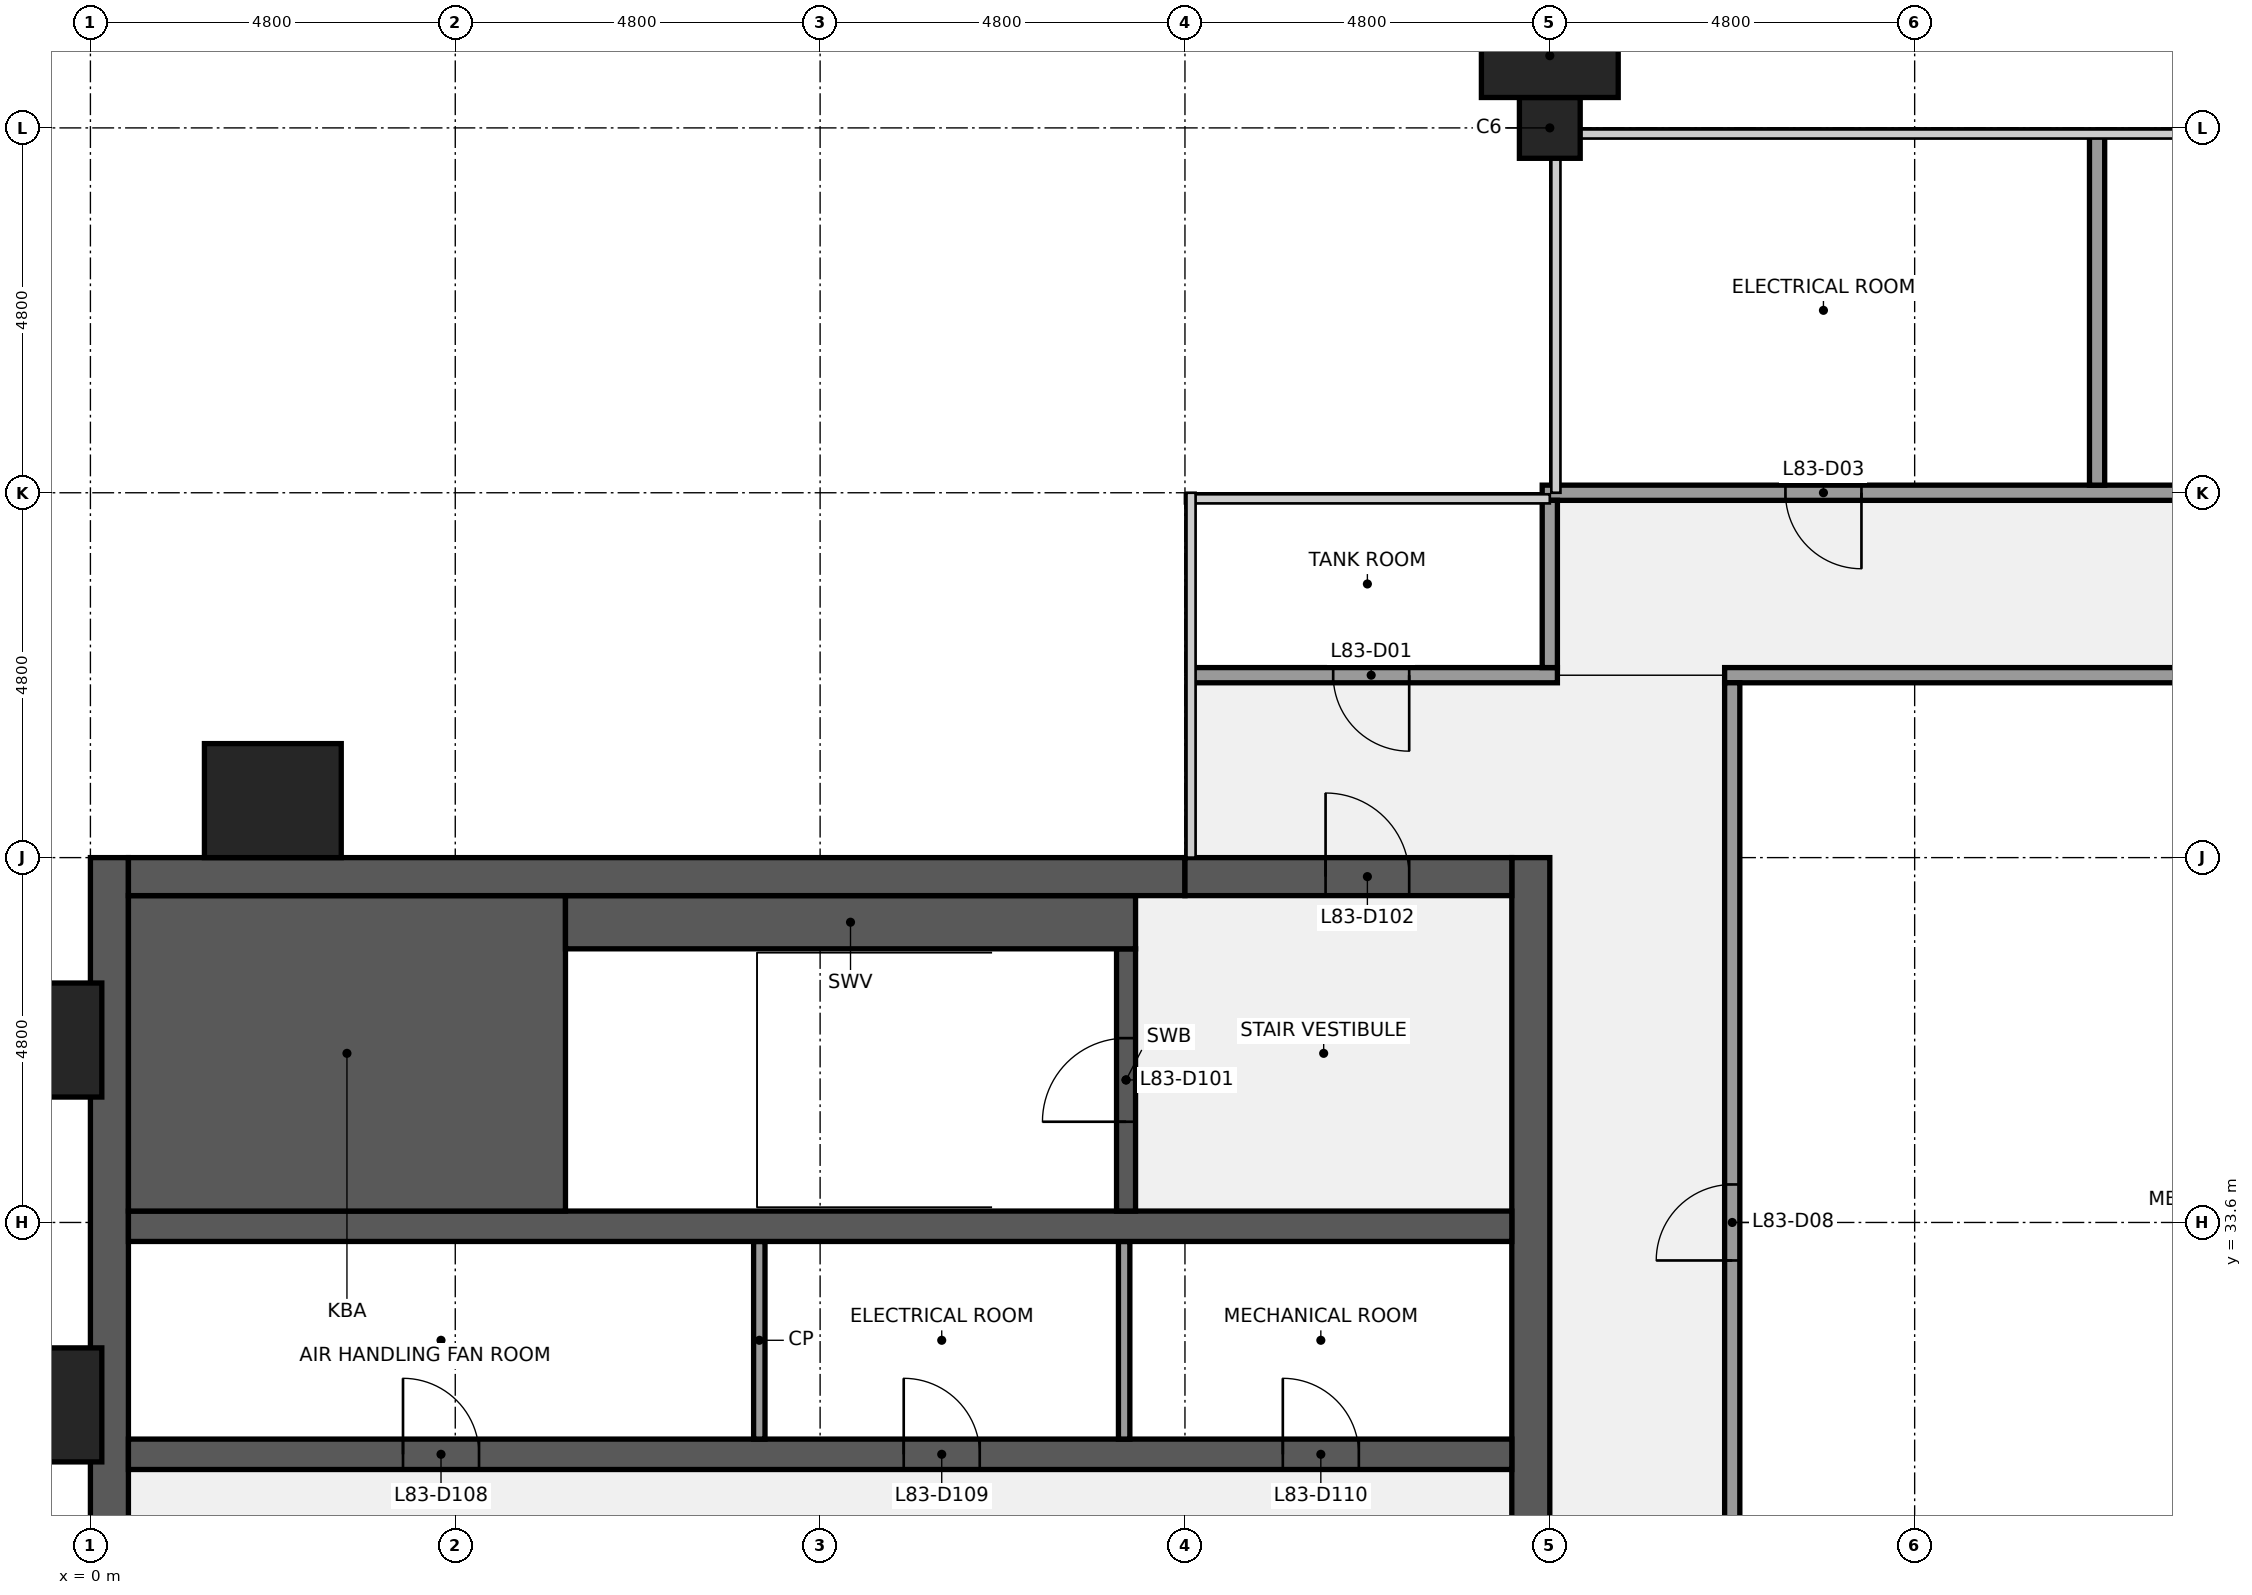
"""IFC4 building model, lengths in metres.
Left out: names, types, materials, properties, quantities, classifications, styles, units other than length and angle.
Written with IfcOpenShell. Run it as: python <this file> out.ifc"""

import sys

from ifc_helpers import new_model, si_unit, direction, frame, frame_2d, origin, origin_2d, place, context, subcontext, project, spatial, polyline, rectangle, outline, extrude, element, fill, save


model = new_model("IFC4")
c1 = context("Model", 3, precision=1e-05, world=origin(), true_north=direction((0.0, 1.0)))
c2 = subcontext(c1, "Body", "Model", "MODEL_VIEW")
j1 = project(units=[si_unit("LENGTHUNIT", "METRE"), si_unit("PLANEANGLEUNIT", "RADIAN")], contexts=[c1])
p1 = place(None, origin())
s1 = spatial("IfcSite", under=j1, at=p1, CompositionType="ELEMENT")
p2 = place(p1, origin())
s2 = spatial("IfcBuilding", under=s1, at=p2, CompositionType="ELEMENT")
p3 = place(p2, frame((0.0, 0.0, 370.3)))
s3 = spatial("IfcBuildingStorey", under=s2, at=p3, CompositionType="ELEMENT", Elevation=370.3)
p4 = place(p3, frame((19.2, 48.0, 0.0), z_axis=(0.0, 0.0, 1.0), x_axis=(1.0, 0.0, 0.0)))
e1 = element("IfcColumn", 1, at=p4, inside=s3, PredefinedType="COLUMN", context=c2, shape_type="SweptSolid", body=[
    extrude(rectangle(XDim=0.8, YDim=0.8, at=origin_2d()), origin(), (0.0, 0.0, 1.0), 4.0),
])
p5 = place(p3, frame((0.25, 10.173, 0.0), z_axis=(0.0, 0.0, 1.0), x_axis=(0.0, 1.0, 0.0)))
e2 = element("IfcWall", 2, at=p5, inside=s3, PredefinedType="SHEAR", context=c2, shape_type="SweptSolid", body=[
    extrude(outline(polyline([(0.0, 0.0), (28.227, 0.0), (28.227, 3.75), (1.247, 3.75), (0.0, 2.488), (0.0, 0.0)])), frame((0.0, 0.25, 0.0), z_axis=(0.0, -1.0, 0.0), x_axis=(1.0, 0.0, 0.0)), (0.0, 0.0, 1.0), 0.5),
])
p6 = place(p3, frame((18.95, 38.4, 0.0), z_axis=(0.0, 0.0, 1.0), x_axis=(0.0, -1.0, 0.0)))
e3 = element("IfcWall", 3, at=p6, inside=s3, PredefinedType="SHEAR", context=c2, shape_type="SweptSolid", body=[
    extrude(outline(polyline([(0.0, 0.0), (28.227, 0.0), (28.227, 2.488), (26.98, 3.75), (0.0, 3.75), (0.0, 0.0)])), frame((0.0, 0.25, 0.0), z_axis=(0.0, -1.0, 0.0), x_axis=(1.0, 0.0, 0.0)), (0.0, 0.0, 1.0), 0.5),
])
p7 = place(p6, frame((18.3, 0.0, 0.0)))
e4 = element("IfcOpeningElement", 4, at=p7, cuts=e3, PredefinedType="OPENING", context=c2, shape_type="SweptSolid", body=[
    extrude(rectangle(XDim=1.8, YDim=2.1, at=frame_2d((0.9, 1.05))), frame((0.0, 0.26, 0.0), z_axis=(0.0, -1.0, 0.0), x_axis=(1.0, 0.0, 0.0)), (0.0, 0.0, 1.0), 0.52),
])
p8 = place(p6, frame((8.7, 0.0, 0.0)))
e5 = element("IfcOpeningElement", 5, at=p8, cuts=e3, PredefinedType="OPENING", context=c2, shape_type="SweptSolid", body=[
    extrude(rectangle(XDim=1.8, YDim=2.1, at=frame_2d((0.9, 1.05))), frame((0.0, 0.26, 0.0), z_axis=(0.0, -1.0, 0.0), x_axis=(1.0, 0.0, 0.0)), (0.0, 0.0, 1.0), 0.52),
])
p9 = place(p3, frame((0.5, 30.55, 0.0), z_axis=(0.0, 0.0, 1.0), x_axis=(1.0, 0.0, 0.0)))
e6 = element("IfcWall", 6, at=p9, inside=s3, PredefinedType="SHEAR", context=c2, shape_type="SweptSolid", body=[
    extrude(rectangle(XDim=18.2, YDim=0.4, at=frame_2d((9.1, 0.0))), origin(), (0.0, 0.0, 1.0), 3.75),
])
p10 = place(p9, frame((3.613, 0.0, 0.0)))
e7 = element("IfcOpeningElement", 7, at=p10, cuts=e6, PredefinedType="OPENING", context=c2, shape_type="SweptSolid", body=[
    extrude(rectangle(XDim=1.0, YDim=2.1, at=frame_2d((0.5, 1.05))), frame((0.0, 0.21, 0.0), z_axis=(0.0, -1.0, 0.0), x_axis=(1.0, 0.0, 0.0)), (0.0, 0.0, 1.0), 0.42),
])
p11 = place(p9, frame((10.2, 0.0, 0.0)))
e8 = element("IfcOpeningElement", 8, at=p11, cuts=e6, PredefinedType="OPENING", context=c2, shape_type="SweptSolid", body=[
    extrude(rectangle(XDim=1.0, YDim=2.1, at=frame_2d((0.5, 1.05))), frame((0.0, 0.21, 0.0), z_axis=(0.0, -1.0, 0.0), x_axis=(1.0, 0.0, 0.0)), (0.0, 0.0, 1.0), 0.42),
])
p12 = place(p9, frame((15.188, 0.0, 0.0)))
e9 = element("IfcOpeningElement", 9, at=p12, cuts=e6, PredefinedType="OPENING", context=c2, shape_type="SweptSolid", body=[
    extrude(rectangle(XDim=1.0, YDim=2.1, at=frame_2d((0.5, 1.05))), frame((0.0, 0.21, 0.0), z_axis=(0.0, -1.0, 0.0), x_axis=(1.0, 0.0, 0.0)), (0.0, 0.0, 1.0), 0.42),
])
for number, where, z_axis, x_axis in (
    (10, (8.8, 30.75, 0.0), (0.0, 0.0, 1.0), (0.0, 1.0, 0.0)),
    (11, (13.6, 30.75, 0.0), (0.0, 0.0, 1.0), (0.0, 1.0, 0.0)),
):
    element("IfcWall", number, at=place(p3, frame(where, z_axis=z_axis, x_axis=x_axis)), inside=s3, PredefinedType="PARTITIONING", context=c2, shape_type="SweptSolid", body=[
        extrude(rectangle(XDim=2.6, YDim=0.15, at=frame_2d((1.3, 0.0))), origin(), (0.0, 0.0, 1.0), 3.75),
    ])
p13 = place(p3, frame((0.5, 33.55, 0.0), z_axis=(0.0, 0.0, 1.0), x_axis=(1.0, 0.0, 0.0)))
e12 = element("IfcWall", 12, at=p13, inside=s3, PredefinedType="SHEAR", context=c2, shape_type="SweptSolid", body=[
    extrude(rectangle(XDim=18.2, YDim=0.4, at=frame_2d((9.1, 0.0))), origin(), (0.0, 0.0, 1.0), 3.75),
])
p14 = place(p3, frame((0.5, 35.825, 0.0), z_axis=(0.0, 0.0, 1.0), x_axis=(1.0, 0.0, 0.0)))
e13 = element("IfcWall", 13, at=p14, inside=s3, PredefinedType="SHEAR", context=c2, shape_type="SweptSolid", body=[
    extrude(rectangle(XDim=5.75, YDim=4.15, at=frame_2d((2.875, 0.0))), origin(), (0.0, 0.0, 1.0), 3.75),
])
p15 = place(p3, frame((13.625, 33.75, 0.0), z_axis=(0.0, 0.0, 1.0), x_axis=(0.0, 1.0, 0.0)))
e14 = element("IfcWall", 14, at=p15, inside=s3, PredefinedType="SHEAR", context=c2, shape_type="SweptSolid", body=[
    extrude(rectangle(XDim=3.45, YDim=0.25, at=frame_2d((1.725, 0.0))), origin(), (0.0, 0.0, 1.0), 3.75),
])
p16 = place(p15, frame((1.175, 0.0, 0.0)))
e15 = element("IfcOpeningElement", 15, at=p16, cuts=e14, PredefinedType="OPENING", context=c2, shape_type="SweptSolid", body=[
    extrude(rectangle(XDim=1.1, YDim=2.1, at=frame_2d((0.55, 1.05))), frame((0.0, 0.135, 0.0), z_axis=(0.0, -1.0, 0.0), x_axis=(1.0, 0.0, 0.0)), (0.0, 0.0, 1.0), 0.27),
])
p17 = place(p3, frame((6.25, 37.55, 0.0), z_axis=(0.0, 0.0, 1.0), x_axis=(1.0, 0.0, 0.0)))
e16 = element("IfcWall", 16, at=p17, inside=s3, PredefinedType="SHEAR", context=c2, shape_type="SweptSolid", body=[
    extrude(rectangle(XDim=7.5, YDim=0.7, at=frame_2d((3.75, 0.0))), origin(), (0.0, 0.0, 1.0), 3.75),
])
p18 = place(p3, frame((0.5, 38.15, 0.0), z_axis=(0.0, 0.0, 1.0), x_axis=(1.0, 0.0, 0.0)))
e17 = element("IfcWall", 17, at=p18, inside=s3, PredefinedType="SHEAR", context=c2, shape_type="SweptSolid", body=[
    extrude(rectangle(XDim=13.9, YDim=0.5, at=frame_2d((6.95, 0.0))), origin(), (0.0, 0.0, 1.0), 3.75),
])
p19 = place(p3, frame((14.4, 38.15, 0.0), z_axis=(0.0, 0.0, 1.0), x_axis=(1.0, 0.0, 0.0)))
e18 = element("IfcWall", 18, at=p19, inside=s3, PredefinedType="SHEAR", context=c2, shape_type="SweptSolid", body=[
    extrude(rectangle(XDim=4.3, YDim=0.5, at=frame_2d((2.15, 0.0))), origin(), (0.0, 0.0, 1.0), 3.75),
])
p20 = place(p19, frame((1.85, 0.0, 0.0)))
e19 = element("IfcOpeningElement", 19, at=p20, cuts=e18, PredefinedType="OPENING", context=c2, shape_type="SweptSolid", body=[
    extrude(rectangle(XDim=1.1, YDim=2.1, at=frame_2d((0.55, 1.05))), frame((0.0, 0.26, 0.0), z_axis=(0.0, -1.0, 0.0), x_axis=(1.0, 0.0, 0.0)), (0.0, 0.0, 1.0), 0.52),
])
p21 = place(p3, frame((14.5, 40.8, 0.0), z_axis=(0.0, 0.0, 1.0), x_axis=(1.0, 0.0, 0.0)))
e20 = element("IfcWall", 20, at=p21, inside=s3, PredefinedType="PARTITIONING", context=c2, shape_type="SweptSolid", body=[
    extrude(rectangle(XDim=4.8, YDim=0.2, at=frame_2d((2.4, 0.0))), origin(), (0.0, 0.0, 1.0), 2.759),
])
p22 = place(p21, frame((1.85, 0.0, 0.0)))
e21 = element("IfcOpeningElement", 21, at=p22, cuts=e20, PredefinedType="OPENING", context=c2, shape_type="SweptSolid", body=[
    extrude(rectangle(XDim=1.0, YDim=2.1, at=frame_2d((0.5, 1.05))), frame((0.0, 0.11, 0.0), z_axis=(0.0, -1.0, 0.0), x_axis=(1.0, 0.0, 0.0)), (0.0, 0.0, 1.0), 0.22),
])
p23 = place(p3, frame((21.5, 40.8, 0.0), z_axis=(0.0, 0.0, 1.0), x_axis=(1.0, 0.0, 0.0)))
e22 = element("IfcWall", 22, at=p23, inside=s3, PredefinedType="PARTITIONING", context=c2, shape_type="SweptSolid", body=[
    extrude(rectangle(XDim=14.6, YDim=0.2, at=frame_2d((7.3, 0.0))), origin(), (0.0, 0.0, 1.0), 2.759),
])
p24 = place(p3, frame((19.1, 43.2, 0.0), z_axis=(0.0, 0.0, 1.0), x_axis=(1.0, 0.0, 0.0)))
e23 = element("IfcWall", 23, at=p24, inside=s3, PredefinedType="PARTITIONING", context=c2, shape_type="SweptSolid", body=[
    extrude(rectangle(XDim=19.4, YDim=0.2, at=frame_2d((9.7, 0.0))), origin(), (0.0, 0.0, 1.0), 2.759),
])
p25 = place(p24, frame((3.2, 0.0, 0.0)))
e24 = element("IfcOpeningElement", 24, at=p25, cuts=e23, PredefinedType="OPENING", context=c2, shape_type="SweptSolid", body=[
    extrude(rectangle(XDim=1.0, YDim=2.1, at=frame_2d((0.5, 1.05))), frame((0.0, 0.11, 0.0), z_axis=(0.0, -1.0, 0.0), x_axis=(1.0, 0.0, 0.0)), (0.0, 0.0, 1.0), 0.22),
])
p26 = place(p24, frame((10.4, 0.0, 0.0)))
e25 = element("IfcOpeningElement", 25, at=p26, cuts=e23, PredefinedType="OPENING", context=c2, shape_type="SweptSolid", body=[
    extrude(rectangle(XDim=1.0, YDim=2.1, at=frame_2d((0.5, 1.05))), frame((0.0, 0.11, 0.0), z_axis=(0.0, -1.0, 0.0), x_axis=(1.0, 0.0, 0.0)), (0.0, 0.0, 1.0), 0.22),
])
p27 = place(p24, frame((16.4, 0.0, 0.0)))
e26 = element("IfcOpeningElement", 26, at=p27, cuts=e23, PredefinedType="OPENING", context=c2, shape_type="SweptSolid", body=[
    extrude(rectangle(XDim=1.0, YDim=2.1, at=frame_2d((0.5, 1.05))), frame((0.0, 0.11, 0.0), z_axis=(0.0, -1.0, 0.0), x_axis=(1.0, 0.0, 0.0)), (0.0, 0.0, 1.0), 0.22),
])
p28 = place(p3, frame((19.2, 40.9, 0.0), z_axis=(0.0, 0.0, 1.0), x_axis=(0.0, 1.0, 0.0)))
e27 = element("IfcWall", 27, at=p28, inside=s3, PredefinedType="PARTITIONING", context=c2, shape_type="SweptSolid", body=[
    extrude(rectangle(XDim=2.2, YDim=0.2, at=frame_2d((1.1, 0.0))), origin(), (0.0, 0.0, 1.0), 2.759),
])
p29 = place(p3, frame((21.6, 26.5, 0.0), z_axis=(0.0, 0.0, 1.0), x_axis=(0.0, 1.0, 0.0)))
e28 = element("IfcWall", 28, at=p29, inside=s3, PredefinedType="PARTITIONING", context=c2, shape_type="SweptSolid", body=[
    extrude(rectangle(XDim=14.2, YDim=0.2, at=frame_2d((7.1, 0.0))), origin(), (0.0, 0.0, 1.0), 2.759),
])
p30 = place(p29, frame((6.6, 0.0, 0.0)))
e29 = element("IfcOpeningElement", 29, at=p30, cuts=e28, PredefinedType="OPENING", context=c2, shape_type="SweptSolid", body=[
    extrude(rectangle(XDim=1.0, YDim=2.1, at=frame_2d((0.5, 1.05))), frame((0.0, 0.11, 0.0), z_axis=(0.0, -1.0, 0.0), x_axis=(1.0, 0.0, 0.0)), (0.0, 0.0, 1.0), 0.22),
])
p31 = place(p3, frame((26.4, 43.3, 0.0), z_axis=(0.0, 0.0, 1.0), x_axis=(0.0, 1.0, 0.0)))
e30 = element("IfcWall", 30, at=p31, inside=s3, PredefinedType="PARTITIONING", context=c2, shape_type="SweptSolid", body=[
    extrude(rectangle(XDim=4.6, YDim=0.2, at=frame_2d((2.3, 0.0))), origin(), (0.0, 0.0, 1.0), 2.759),
])
for number, where, z_axis, x_axis in (
    (31, (-0.75, 31.2, 0.0), (0.0, 0.0, 1.0), (0.0, 1.0, 0.0)),
    (32, (-0.75, 36.0, 0.0), (0.0, 0.0, 1.0), (0.0, 1.0, 0.0)),
    (33, (2.4, 39.15, 0.0), (0.0, 0.0, 1.0), (1.0, 0.0, 0.0)),
):
    element("IfcColumn", number, at=place(p3, frame(where, z_axis=z_axis, x_axis=x_axis)), inside=s3, PredefinedType="PILASTER", context=c2, shape_type="SweptSolid", body=[
        extrude(rectangle(XDim=1.8, YDim=1.5, at=origin_2d()), origin(), (0.0, 0.0, 1.0), 4.0),
    ])
p32 = place(p3, frame((19.2, 48.95, 0.0), z_axis=(0.0, 0.0, 1.0), x_axis=(1.0, 0.0, 0.0)))
e34 = element("IfcColumn", 34, at=p32, inside=s3, PredefinedType="PILASTER", context=c2, shape_type="SweptSolid", body=[
    extrude(rectangle(XDim=1.8, YDim=1.1, at=origin_2d()), origin(), (0.0, 0.0, 1.0), 4.0),
])
p33 = place(p16, origin())
e35 = element("IfcDoor", 35, at=p33, inside=s3, OperationType="SINGLE_SWING_LEFT", PredefinedType="DOOR", context=c2, shape_type="SweptSolid", body=[
    extrude(rectangle(XDim=1.1, YDim=2.1, at=frame_2d((0.55, 1.05))), frame((0.0, 0.025, 0.0), z_axis=(0.0, -1.0, 0.0), x_axis=(1.0, 0.0, 0.0)), (0.0, 0.0, 1.0), 0.05),
])
fill(e15, e35)
p34 = place(p20, origin())
e36 = element("IfcDoor", 36, at=p34, inside=s3, OperationType="SINGLE_SWING_LEFT", PredefinedType="DOOR", context=c2, shape_type="SweptSolid", body=[
    extrude(rectangle(XDim=1.1, YDim=2.1, at=frame_2d((0.55, 1.05))), frame((0.0, 0.025, 0.0), z_axis=(0.0, -1.0, 0.0), x_axis=(1.0, 0.0, 0.0)), (0.0, 0.0, 1.0), 0.05),
])
fill(e19, e36)
p35 = place(p10, origin())
e37 = element("IfcDoor", 37, at=p35, inside=s3, OperationType="SINGLE_SWING_LEFT", PredefinedType="DOOR", context=c2, shape_type="SweptSolid", body=[
    extrude(rectangle(XDim=1.0, YDim=2.1, at=frame_2d((0.5, 1.05))), frame((0.0, 0.025, 0.0), z_axis=(0.0, -1.0, 0.0), x_axis=(1.0, 0.0, 0.0)), (0.0, 0.0, 1.0), 0.05),
])
fill(e7, e37)
p36 = place(p11, origin())
e38 = element("IfcDoor", 38, at=p36, inside=s3, OperationType="SINGLE_SWING_LEFT", PredefinedType="DOOR", context=c2, shape_type="SweptSolid", body=[
    extrude(rectangle(XDim=1.0, YDim=2.1, at=frame_2d((0.5, 1.05))), frame((0.0, 0.025, 0.0), z_axis=(0.0, -1.0, 0.0), x_axis=(1.0, 0.0, 0.0)), (0.0, 0.0, 1.0), 0.05),
])
fill(e8, e38)
p37 = place(p12, origin())
e39 = element("IfcDoor", 39, at=p37, inside=s3, OperationType="SINGLE_SWING_LEFT", PredefinedType="DOOR", context=c2, shape_type="SweptSolid", body=[
    extrude(rectangle(XDim=1.0, YDim=2.1, at=frame_2d((0.5, 1.05))), frame((0.0, 0.025, 0.0), z_axis=(0.0, -1.0, 0.0), x_axis=(1.0, 0.0, 0.0)), (0.0, 0.0, 1.0), 0.05),
])
fill(e9, e39)
p38 = place(p22, origin())
e40 = element("IfcDoor", 40, at=p38, inside=s3, OperationType="SINGLE_SWING_RIGHT", PredefinedType="DOOR", context=c2, shape_type="SweptSolid", body=[
    extrude(rectangle(XDim=1.0, YDim=2.1, at=frame_2d((0.5, 1.05))), frame((0.0, 0.025, 0.0), z_axis=(0.0, -1.0, 0.0), x_axis=(1.0, 0.0, 0.0)), (0.0, 0.0, 1.0), 0.05),
])
fill(e21, e40)
p39 = place(p25, origin())
e41 = element("IfcDoor", 41, at=p39, inside=s3, OperationType="SINGLE_SWING_RIGHT", PredefinedType="DOOR", context=c2, shape_type="SweptSolid", body=[
    extrude(rectangle(XDim=1.0, YDim=2.1, at=frame_2d((0.5, 1.05))), frame((0.0, 0.025, 0.0), z_axis=(0.0, -1.0, 0.0), x_axis=(1.0, 0.0, 0.0)), (0.0, 0.0, 1.0), 0.05),
])
fill(e24, e41)
p40 = place(p30, origin())
e42 = element("IfcDoor", 42, at=p40, inside=s3, OperationType="SINGLE_SWING_LEFT", PredefinedType="DOOR", context=c2, shape_type="SweptSolid", body=[
    extrude(rectangle(XDim=1.0, YDim=2.1, at=frame_2d((0.5, 1.05))), frame((0.0, 0.025, 0.0), z_axis=(0.0, -1.0, 0.0), x_axis=(1.0, 0.0, 0.0)), (0.0, 0.0, 1.0), 0.05),
])
fill(e29, e42)
save(model, sys.argv[1])
